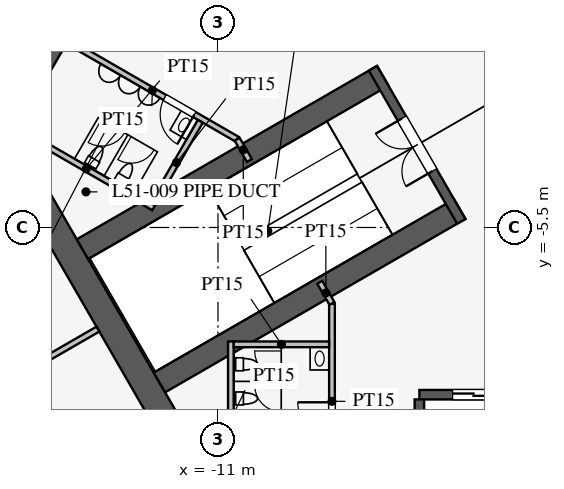
"""IFC4 building model, lengths in metres.
Left out: names, types, materials, properties, quantities, classifications, styles, units other than length and angle.
Written with IfcOpenShell. Run it as: python <this file> out.ifc"""

import sys

from ifc_helpers import new_model, si_unit, direction, frame, frame_2d, origin, place, context, subcontext, project, spatial, rectangle, extrude, element, fill, save


model = new_model("IFC4")
c1 = context("Model", 3, precision=1e-05, world=origin(), true_north=direction((0.0, 1.0)))
c2 = subcontext(c1, "Body", "Model", "MODEL_VIEW")
j1 = project(units=[si_unit("LENGTHUNIT", "METRE"), si_unit("PLANEANGLEUNIT", "RADIAN")], contexts=[c1])
p1 = place(None, origin())
s1 = spatial("IfcSite", under=j1, at=p1, CompositionType="ELEMENT")
p2 = place(p1, origin())
s2 = spatial("IfcBuilding", under=s1, at=p2, CompositionType="ELEMENT")
p3 = place(p2, frame((0.0, 0.0, 223.3)))
s3 = spatial("IfcBuildingStorey", under=s2, at=p3, CompositionType="ELEMENT", Elevation=223.3)
p4 = place(p3, frame((-5.773, 16.0, 0.0), z_axis=(0.0, 0.0, 1.0), x_axis=(-0.500002442456, -0.866023993627, 0.0)))
e1 = element("IfcWall", 1, at=p4, inside=s3, PredefinedType="SHEAR", context=c2, shape_type="SweptSolid", body=[
    extrude(rectangle(XDim=21.939, YDim=0.7, at=frame_2d((10.97, 0.0))), origin(), (0.0, 0.0, 1.0), 4.2),
])
p5 = place(p4, frame((17.27, 0.0, 0.0)))
e2 = element("IfcOpeningElement", 2, at=p5, cuts=e1, PredefinedType="OPENING", context=c2, shape_type="SweptSolid", body=[
    extrude(rectangle(XDim=1.2, YDim=2.1, at=frame_2d((0.6, 1.05))), frame((0.0, 0.36, 0.0), z_axis=(0.0, -1.0, 0.0), x_axis=(1.0, 0.0, 0.0)), (0.0, 0.0, 1.0), 0.72),
])
p6 = place(p4, frame((3.47, 0.0, 0.0)))
e3 = element("IfcOpeningElement", 3, at=p6, cuts=e1, PredefinedType="OPENING", context=c2, shape_type="SweptSolid", body=[
    extrude(rectangle(XDim=1.2, YDim=2.1, at=frame_2d((0.6, 1.05))), frame((0.0, 0.36, 0.0), z_axis=(0.0, -1.0, 0.0), x_axis=(1.0, 0.0, 0.0)), (0.0, 0.0, 1.0), 0.72),
])
p7 = place(p3, frame((-16.743, -3.0, 0.0), z_axis=(0.0, 0.0, 1.0), x_axis=(0.499995765644, -0.866027848477, 0.0)))
e4 = element("IfcWall", 4, at=p7, inside=s3, PredefinedType="SHEAR", context=c2, shape_type="SweptSolid", body=[
    extrude(rectangle(XDim=11.547, YDim=0.7, at=frame_2d((5.773, 0.0))), origin(), (0.0, 0.0, 1.0), 4.2),
])
p8 = place(p3, frame((-5.7, -9.9, 0.0), z_axis=(0.0, 0.0, 1.0), x_axis=(1.0, 0.0, 0.0)))
e5 = element("IfcWall", 5, at=p8, inside=s3, PredefinedType="SHEAR", context=c2, shape_type="SweptSolid", body=[
    extrude(rectangle(XDim=11.4, YDim=0.25, at=frame_2d((5.7, 0.0))), origin(), (0.0, 0.0, 1.0), 4.2),
])
p9 = place(p8, frame((0.875, 0.0, 0.0)))
e6 = element("IfcOpeningElement", 6, at=p9, cuts=e5, PredefinedType="OPENING", context=c2, shape_type="SweptSolid", body=[
    extrude(rectangle(XDim=1.1, YDim=2.2, at=frame_2d((0.55, 1.1))), frame((0.0, 0.135, 0.0), z_axis=(0.0, -1.0, 0.0), x_axis=(1.0, 0.0, 0.0)), (0.0, 0.0, 1.0), 0.27),
])
p10 = place(p8, frame((3.725, 0.0, 0.0)))
e7 = element("IfcOpeningElement", 7, at=p10, cuts=e5, PredefinedType="OPENING", context=c2, shape_type="SweptSolid", body=[
    extrude(rectangle(XDim=1.1, YDim=2.2, at=frame_2d((0.55, 1.1))), frame((0.0, 0.135, 0.0), z_axis=(0.0, -1.0, 0.0), x_axis=(1.0, 0.0, 0.0)), (0.0, 0.0, 1.0), 0.27),
])
p11 = place(p8, frame((6.575, 0.0, 0.0)))
e8 = element("IfcOpeningElement", 8, at=p11, cuts=e5, PredefinedType="OPENING", context=c2, shape_type="SweptSolid", body=[
    extrude(rectangle(XDim=1.1, YDim=2.2, at=frame_2d((0.55, 1.1))), frame((0.0, 0.135, 0.0), z_axis=(0.0, -1.0, 0.0), x_axis=(1.0, 0.0, 0.0)), (0.0, 0.0, 1.0), 0.27),
])
p12 = place(p8, frame((9.425, 0.0, 0.0)))
e9 = element("IfcOpeningElement", 9, at=p12, cuts=e5, PredefinedType="OPENING", context=c2, shape_type="SweptSolid", body=[
    extrude(rectangle(XDim=1.1, YDim=2.2, at=frame_2d((0.55, 1.1))), frame((0.0, 0.135, 0.0), z_axis=(0.0, -1.0, 0.0), x_axis=(1.0, 0.0, 0.0)), (0.0, 0.0, 1.0), 0.27),
])
p13 = place(p3, frame((-5.7, -10.025, 0.0), z_axis=(0.0, 0.0, 1.0), x_axis=(0.0, -1.0, 0.0)))
e10 = element("IfcWall", 10, at=p13, inside=s3, PredefinedType="SHEAR", context=c2, shape_type="SweptSolid", body=[
    extrude(rectangle(XDim=2.625, YDim=0.25, at=frame_2d((1.312, 0.0))), origin(), (0.0, 0.0, 1.0), 4.2),
])
for number, where, z_axis, x_axis in (
    (11, (-6.663, -1.509, 0.0), (0.0, 0.0, 1.0), (-0.866, -0.5, 0.0)),
    (12, (-4.638, -5.016, 0.0), (0.0, 0.0, 1.0), (-0.866, -0.5, 0.0)),
):
    element("IfcWall", number, at=place(p3, frame(where, z_axis=z_axis, x_axis=x_axis)), inside=s3, PredefinedType="SHEAR", context=c2, shape_type="SweptSolid", body=[
        extrude(rectangle(XDim=9.125, YDim=0.6, at=frame_2d((4.562, 0.0))), origin(), (0.0, 0.0, 1.0), 4.2),
    ])
p14 = place(p3, frame((-6.922, -1.312, 0.0), z_axis=(0.0, 0.0, 1.0), x_axis=(0.499984536904, -0.866034331223, 0.0)))
e13 = element("IfcWall", 13, at=p14, inside=s3, PredefinedType="SHEAR", context=c2, shape_type="SweptSolid", body=[
    extrude(rectangle(XDim=4.65, YDim=0.25, at=frame_2d((2.325, 0.0))), origin(), (0.0, 0.0, 1.0), 4.2),
])
p15 = place(p14, frame((1.525, 0.0, 0.0)))
e14 = element("IfcOpeningElement", 14, at=p15, cuts=e13, PredefinedType="OPENING", context=c2, shape_type="SweptSolid", body=[
    extrude(rectangle(XDim=1.6, YDim=2.1, at=frame_2d((0.8, 1.05))), frame((0.0, 0.135, 0.0), z_axis=(0.0, -1.0, 0.0), x_axis=(1.0, 0.0, 0.0)), (0.0, 0.0, 1.0), 0.27),
])
p16 = place(p3, frame((-8.0, -7.5, 0.0), z_axis=(0.0, 0.0, 1.0), x_axis=(0.0, -1.0, 0.0)))
e15 = element("IfcWall", 15, at=p16, inside=s3, PredefinedType="PARTITIONING", context=c2, shape_type="SweptSolid", body=[
    extrude(rectangle(XDim=5.15, YDim=0.15, at=frame_2d((2.575, 0.0))), origin(), (0.0, 0.0, 1.0), 4.0),
])
p17 = place(p16, frame((2.6, 0.0, 0.0)))
e16 = element("IfcOpeningElement", 16, at=p17, cuts=e15, PredefinedType="OPENING", context=c2, shape_type="SweptSolid", body=[
    extrude(rectangle(XDim=0.9, YDim=2.1, at=frame_2d((0.45, 1.05))), frame((0.0, 0.085, 0.0), z_axis=(0.0, -1.0, 0.0), x_axis=(1.0, 0.0, 0.0)), (0.0, 0.0, 1.0), 0.17),
])
p18 = place(p3, frame((-10.495, -3.178, 0.0), z_axis=(0.0, 0.0, 1.0), x_axis=(-0.866037967349, 0.499978238636, 0.0)))
e17 = element("IfcWall", 17, at=p18, inside=s3, PredefinedType="PARTITIONING", context=c2, shape_type="SweptSolid", body=[
    extrude(rectangle(XDim=5.15, YDim=0.15, at=frame_2d((2.575, 0.0))), origin(), (0.0, 0.0, 1.0), 4.0),
])
p19 = place(p18, frame((1.3, 0.0, 0.0)))
e18 = element("IfcOpeningElement", 18, at=p19, cuts=e17, PredefinedType="OPENING", context=c2, shape_type="SweptSolid", body=[
    extrude(rectangle(XDim=0.9, YDim=2.1, at=frame_2d((0.45, 1.05))), frame((0.0, 0.085, 0.0), z_axis=(0.0, -1.0, 0.0), x_axis=(1.0, 0.0, 0.0)), (0.0, 0.0, 1.0), 0.17),
])
for number, where, z_axis, x_axis in (
    (19, (-10.495, -3.178, 0.0), (0.0, 0.0, 1.0), (0.5, -0.866, 0.0)),
    (20, (-8.0, -7.5, 0.0), (0.0, 0.0, 1.0), (-0.5, 0.866, 0.0)),
):
    element("IfcWall", number, at=place(p3, frame(where, z_axis=z_axis, x_axis=x_axis)), inside=s3, PredefinedType="PARTITIONING", context=c2, shape_type="SweptSolid", body=[
        extrude(rectangle(XDim=0.645, YDim=0.15, at=frame_2d((0.323, 0.0))), origin(), (0.0, 0.0, 1.0), 4.0),
    ])
p20 = place(p3, frame((-12.691, -4.982, 0.0), z_axis=(0.0, 0.0, 1.0), x_axis=(-0.8660249478, 0.500000789788, 0.0)))
e21 = element("IfcWall", 21, at=p20, inside=s3, PredefinedType="PARTITIONING", context=c2, shape_type="SweptSolid", body=[
    extrude(rectangle(XDim=4.1, YDim=0.15, at=frame_2d((2.05, 0.0))), origin(), (0.0, 0.0, 1.0), 4.0),
])
p21 = place(p3, frame((-11.464, -2.706, 0.0), z_axis=(0.0, 0.0, 1.0), x_axis=(-0.50001992892, -0.866013897511, 0.0)))
e22 = element("IfcWall", 22, at=p21, inside=s3, PredefinedType="PARTITIONING", context=c2, shape_type="SweptSolid", body=[
    extrude(rectangle(XDim=2.51, YDim=0.15, at=frame_2d((1.255, 0.0))), origin(), (0.0, 0.0, 1.0), 4.0),
])
p22 = place(p3, frame((-10.66, -8.5, 0.0), z_axis=(0.0, 0.0, 1.0), x_axis=(0.0, -1.0, 0.0)))
e23 = element("IfcWall", 23, at=p22, inside=s3, PredefinedType="PARTITIONING", context=c2, shape_type="SweptSolid", body=[
    extrude(rectangle(XDim=4.1, YDim=0.15, at=frame_2d((2.05, 0.0))), origin(), (0.0, 0.0, 1.0), 4.0),
])
p23 = place(p3, frame((-8.075, -8.575, 0.0), z_axis=(0.0, 0.0, 1.0), x_axis=(-1.0, 0.0, 0.0)))
e24 = element("IfcWall", 24, at=p23, inside=s3, PredefinedType="PARTITIONING", context=c2, shape_type="SweptSolid", body=[
    extrude(rectangle(XDim=2.51, YDim=0.15, at=frame_2d((1.255, 0.0))), origin(), (0.0, 0.0, 1.0), 4.0),
])
p24 = place(p3, frame((-14.159, -8.175, 0.0), z_axis=(0.0, 0.0, 1.0), x_axis=(-0.866027028085, -0.499997186618, 0.0)))
e25 = element("IfcWall", 25, at=p24, inside=s3, PredefinedType="PARTITIONING", context=c2, shape_type="SweptSolid", body=[
    extrude(rectangle(XDim=15.0, YDim=0.15, at=frame_2d((7.5, 0.0))), origin(), (0.0, 0.0, 1.0), 2.4),
])
p25 = place(p3, frame((-0.016, 30.392, 0.0), z_axis=(0.0, 0.0, 1.0), x_axis=(-0.500000626146, -0.866025042278, 0.0)))
e26 = element("IfcWall", 26, at=p25, inside=s3, PredefinedType="PARTITIONING", context=c2, shape_type="SweptSolid", body=[
    extrude(rectangle(XDim=52.624, YDim=0.12, at=frame_2d((26.312, 0.0))), origin(), (0.0, 0.0, 1.0), 2.9),
])
p26 = place(p25, frame((10.15, 0.0, 0.15)))
e27 = element("IfcOpeningElement", 27, at=p26, cuts=e26, PredefinedType="OPENING", context=c2, shape_type="SweptSolid", body=[
    extrude(rectangle(XDim=1.8, YDim=2.1, at=frame_2d((0.9, 1.05))), frame((0.0, 0.07, 0.0), z_axis=(0.0, -1.0, 0.0), x_axis=(1.0, 0.0, 0.0)), (0.0, 0.0, 1.0), 0.14),
])
p27 = place(p25, frame((40.65, 0.0, 0.15)))
e28 = element("IfcOpeningElement", 28, at=p27, cuts=e26, PredefinedType="OPENING", context=c2, shape_type="SweptSolid", body=[
    extrude(rectangle(XDim=1.8, YDim=2.1, at=frame_2d((0.9, 1.05))), frame((0.0, 0.07, 0.0), z_axis=(0.0, -1.0, 0.0), x_axis=(1.0, 0.0, 0.0)), (0.0, 0.0, 1.0), 0.14),
])
p28 = place(p17, frame((0.9, 0.0, 0.0), z_axis=(0.0, 0.0, 1.0), x_axis=(-1.0, 0.0, 0.0)))
e29 = element("IfcDoor", 29, at=p28, inside=s3, OperationType="SINGLE_SWING_RIGHT", PredefinedType="DOOR", context=c2, shape_type="SweptSolid", body=[
    extrude(rectangle(XDim=0.9, YDim=2.1, at=frame_2d((0.45, 1.05))), frame((0.0, 0.025, 0.0), z_axis=(0.0, -1.0, 0.0), x_axis=(1.0, 0.0, 0.0)), (0.0, 0.0, 1.0), 0.05),
])
fill(e16, e29)
p29 = place(p19, origin())
e30 = element("IfcDoor", 30, at=p29, inside=s3, OperationType="SINGLE_SWING_LEFT", PredefinedType="DOOR", context=c2, shape_type="SweptSolid", body=[
    extrude(rectangle(XDim=0.9, YDim=2.1, at=frame_2d((0.45, 1.05))), frame((0.0, 0.025, 0.0), z_axis=(0.0, -1.0, 0.0), x_axis=(1.0, 0.0, 0.0)), (0.0, 0.0, 1.0), 0.05),
])
fill(e18, e30)
p30 = place(p15, frame((1.6, 0.0, 0.0), z_axis=(0.0, 0.0, 1.0), x_axis=(-1.0, 0.0, 0.0)))
e31 = element("IfcDoor", 31, at=p30, inside=s3, OperationType="DOUBLE_DOOR_SINGLE_SWING", PredefinedType="DOOR", context=c2, shape_type="SweptSolid", body=[
    extrude(rectangle(XDim=1.6, YDim=2.1, at=frame_2d((0.8, 1.05))), frame((0.0, 0.025, 0.0), z_axis=(0.0, -1.0, 0.0), x_axis=(1.0, 0.0, 0.0)), (0.0, 0.0, 1.0), 0.05),
])
fill(e14, e31)
p31 = place(p9, origin())
e32 = element("IfcDoor", 32, at=p31, inside=s3, OperationType="DOUBLE_DOOR_SLIDING", PredefinedType="DOOR", context=c2, shape_type="SweptSolid", body=[
    extrude(rectangle(XDim=1.1, YDim=2.2, at=frame_2d((0.55, 1.1))), frame((0.0, 0.025, 0.0), z_axis=(0.0, -1.0, 0.0), x_axis=(1.0, 0.0, 0.0)), (0.0, 0.0, 1.0), 0.05),
])
fill(e6, e32)
save(model, sys.argv[1])
